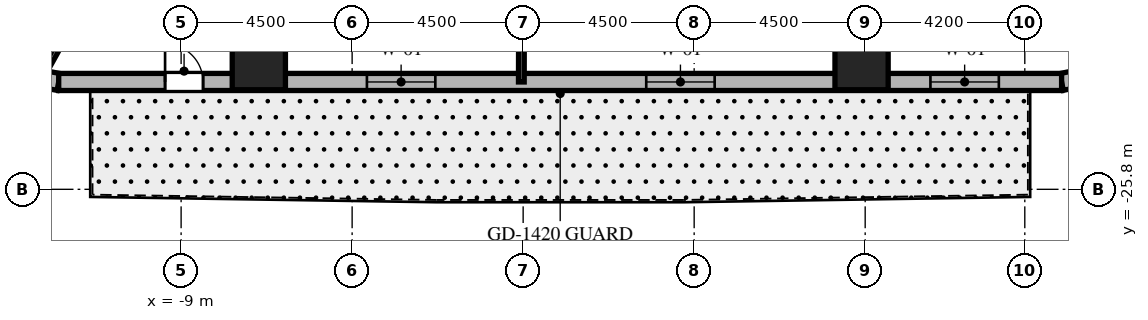
"""IFC4 building model, lengths in metres.
Left out: names, types, materials, properties, quantities, classifications, styles, units other than length and angle.
Written with IfcOpenShell. Run it as: python <this file> out.ifc"""

import sys

from ifc_helpers import new_model, si_unit, direction, frame, frame_2d, origin, origin_2d, place, context, subcontext, project, spatial, rectangle, extrude, element, fill, save


model = new_model("IFC4")
c1 = context("Model", 3, precision=1e-05, world=origin(), true_north=direction((0.0, 1.0)))
c2 = subcontext(c1, "Body", "Model", "MODEL_VIEW")
j1 = project(units=[si_unit("LENGTHUNIT", "METRE"), si_unit("PLANEANGLEUNIT", "RADIAN")], contexts=[c1])
p1 = place(None, origin())
s1 = spatial("IfcSite", under=j1, at=p1, CompositionType="ELEMENT")
p2 = place(p1, origin())
s2 = spatial("IfcBuilding", under=s1, at=p2, CompositionType="ELEMENT")
p3 = place(p2, frame((0.0, 0.0, 34.2)))
s3 = spatial("IfcBuildingStorey", under=s2, at=p3, CompositionType="ELEMENT", Elevation=34.2)
for number, where, z_axis, x_axis in (
    (1, (-6.955, -22.48, 0.0), (0.0, 0.0, 1.0), (1.0, 0.0, 0.0)),
    (2, (8.905, -22.48, 0.0), (0.0, 0.0, 1.0), (1.0, 0.0, 0.0)),
):
    element("IfcColumn", number, at=place(p3, frame(where, z_axis=z_axis, x_axis=x_axis)), inside=s3, PredefinedType="COLUMN", context=c2, shape_type="SweptSolid", body=[
        extrude(rectangle(XDim=1.4, YDim=1.4, at=origin_2d()), origin(), (0.0, 0.0, 1.0), 3.7),
    ])
p4 = place(p3, frame((-13.468, -22.74, 0.0), z_axis=(0.0, 0.0, 1.0), x_axis=(0.982717174228, -0.185113358451, 0.0)))
e3 = element("IfcWall", 3, at=p4, inside=s3, PredefinedType="SOLIDWALL", context=c2, shape_type="SweptSolid", body=[
    extrude(rectangle(XDim=1.269, YDim=0.45, at=frame_2d((0.634, 0.0))), origin(), (0.0, 0.0, 1.0), 3.4),
])
p5 = place(p3, frame((14.168, -22.975, 0.0), z_axis=(0.0, 0.0, 1.0), x_axis=(0.978770371074, 0.204959900243, 0.0)))
e4 = element("IfcWall", 4, at=p5, inside=s3, PredefinedType="SOLIDWALL", context=c2, shape_type="SweptSolid", body=[
    extrude(rectangle(XDim=1.406, YDim=0.45, at=frame_2d((0.703, 0.0))), origin(), (0.0, 0.0, 1.0), 3.4),
])
p6 = place(p3, frame((-12.221, -22.975, 0.0), z_axis=(0.0, 0.0, 1.0), x_axis=(1.0, 0.0, 0.0)))
e5 = element("IfcWall", 5, at=p6, inside=s3, PredefinedType="SOLIDWALL", context=c2, shape_type="SweptSolid", body=[
    extrude(rectangle(XDim=26.389, YDim=0.45, at=frame_2d((13.195, 0.0))), origin(), (0.0, 0.0, 1.0), 3.4),
])
p7 = place(p6, frame((2.799, 0.0, 0.0)))
e6 = element("IfcOpeningElement", 6, at=p7, cuts=e5, PredefinedType="OPENING", context=c2, shape_type="SweptSolid", body=[
    extrude(rectangle(XDim=1.0, YDim=2.15, at=frame_2d((0.5, 1.075))), frame((0.0, 0.235, 0.0), z_axis=(0.0, -1.0, 0.0), x_axis=(1.0, 0.0, 0.0)), (0.0, 0.0, 1.0), 0.47),
])
p8 = place(p6, frame((8.11, 0.0, 0.8)))
e7 = element("IfcOpeningElement", 7, at=p8, cuts=e5, PredefinedType="OPENING", context=c2, shape_type="SweptSolid", body=[
    extrude(rectangle(XDim=1.8, YDim=1.8, at=frame_2d((0.9, 0.9))), frame((0.0, 0.235, 0.0), z_axis=(0.0, -1.0, 0.0), x_axis=(1.0, 0.0, 0.0)), (0.0, 0.0, 1.0), 0.47),
])
p9 = place(p6, frame((15.46, 0.0, 0.8)))
e8 = element("IfcOpeningElement", 8, at=p9, cuts=e5, PredefinedType="OPENING", context=c2, shape_type="SweptSolid", body=[
    extrude(rectangle(XDim=1.8, YDim=1.8, at=frame_2d((0.9, 0.9))), frame((0.0, 0.235, 0.0), z_axis=(0.0, -1.0, 0.0), x_axis=(1.0, 0.0, 0.0)), (0.0, 0.0, 1.0), 0.47),
])
p10 = place(p6, frame((22.938, 0.0, 0.8)))
e9 = element("IfcOpeningElement", 9, at=p10, cuts=e5, PredefinedType="OPENING", context=c2, shape_type="SweptSolid", body=[
    extrude(rectangle(XDim=1.8, YDim=1.8, at=frame_2d((0.9, 0.9))), frame((0.0, 0.235, 0.0), z_axis=(0.0, -1.0, 0.0), x_axis=(1.0, 0.0, 0.0)), (0.0, 0.0, 1.0), 0.47),
])
p11 = place(p3, frame((-5.471, -9.85, 0.0), z_axis=(0.0, 0.0, 1.0), x_axis=(-0.48553323157, -0.874218211341, 0.0)))
e10 = element("IfcWall", 10, at=p11, inside=s3, PredefinedType="PARTITIONING", context=c2, shape_type="SweptSolid", body=[
    extrude(rectangle(XDim=14.74, YDim=0.15, at=frame_2d((7.37, 0.0))), origin(), (0.0, 0.0, 1.0), 2.54),
])
p12 = place(p3, frame((-3.048, -9.85, 0.0), z_axis=(0.0, 0.0, 1.0), x_axis=(-0.295553992761, -0.955326037206, 0.0)))
e11 = element("IfcWall", 11, at=p12, inside=s3, PredefinedType="PARTITIONING", context=c2, shape_type="SweptSolid", body=[
    extrude(rectangle(XDim=13.739, YDim=0.15, at=frame_2d((6.869, 0.0))), origin(), (0.0, 0.0, 1.0), 2.54),
])
p13 = place(p3, frame((-0.021, -9.85, 0.0), z_axis=(0.0, 0.0, 1.0), x_axis=(-0.002064727742, -0.999997868447, 0.0)))
e12 = element("IfcWall", 12, at=p13, inside=s3, PredefinedType="PARTITIONING", context=c2, shape_type="SweptSolid", body=[
    extrude(rectangle(XDim=13.125, YDim=0.15, at=frame_2d((6.562, 0.0))), origin(), (0.0, 0.0, 1.0), 2.54),
])
p14 = place(p3, frame((3.902, -9.85, 0.0), z_axis=(0.0, 0.0, 1.0), x_axis=(0.36828765711, -0.929711891728, 0.0)))
e13 = element("IfcWall", 13, at=p14, inside=s3, PredefinedType="PARTITIONING", context=c2, shape_type="SweptSolid", body=[
    extrude(rectangle(XDim=14.117, YDim=0.15, at=frame_2d((7.059, 0.0))), origin(), (0.0, 0.0, 1.0), 2.54),
])
p15 = place(p3, frame((6.869, -9.85, 0.0), z_axis=(0.0, 0.0, 1.0), x_axis=(0.572039834497, -0.820225839479, 0.0)))
e14 = element("IfcWall", 14, at=p15, inside=s3, PredefinedType="PARTITIONING", context=c2, shape_type="SweptSolid", body=[
    extrude(rectangle(XDim=15.329, YDim=0.15, at=frame_2d((7.665, 0.0))), origin(), (0.0, 0.0, 1.0), 2.54),
])
p16 = place(p7, origin())
e15 = element("IfcDoor", 15, at=p16, inside=s3, OperationType="SINGLE_SWING_LEFT", PredefinedType="DOOR", context=c2, shape_type="SweptSolid", body=[
    extrude(rectangle(XDim=1.0, YDim=2.15, at=frame_2d((0.5, 1.075))), frame((0.0, 0.025, 0.0), z_axis=(0.0, -1.0, 0.0), x_axis=(1.0, 0.0, 0.0)), (0.0, 0.0, 1.0), 0.05),
])
fill(e6, e15)
p17 = place(p8, origin())
e16 = element("IfcWindow", 16, at=p17, inside=s3, PartitioningType="SINGLE_PANEL", PredefinedType="WINDOW", context=c2, shape_type="SweptSolid", body=[
    extrude(rectangle(XDim=1.8, YDim=1.8, at=frame_2d((0.9, 0.9))), frame((0.0, 0.03, 0.0), z_axis=(0.0, -1.0, 0.0), x_axis=(1.0, 0.0, 0.0)), (0.0, 0.0, 1.0), 0.06),
])
fill(e7, e16)
p18 = place(p9, origin())
e17 = element("IfcWindow", 17, at=p18, inside=s3, PartitioningType="SINGLE_PANEL", PredefinedType="WINDOW", context=c2, shape_type="SweptSolid", body=[
    extrude(rectangle(XDim=1.8, YDim=1.8, at=frame_2d((0.9, 0.9))), frame((0.0, 0.03, 0.0), z_axis=(0.0, -1.0, 0.0), x_axis=(1.0, 0.0, 0.0)), (0.0, 0.0, 1.0), 0.06),
])
fill(e8, e17)
p19 = place(p10, origin())
e18 = element("IfcWindow", 18, at=p19, inside=s3, PartitioningType="SINGLE_PANEL", PredefinedType="WINDOW", context=c2, shape_type="SweptSolid", body=[
    extrude(rectangle(XDim=1.8, YDim=1.8, at=frame_2d((0.9, 0.9))), frame((0.0, 0.03, 0.0), z_axis=(0.0, -1.0, 0.0), x_axis=(1.0, 0.0, 0.0)), (0.0, 0.0, 1.0), 0.06),
])
fill(e9, e18)
save(model, sys.argv[1])
